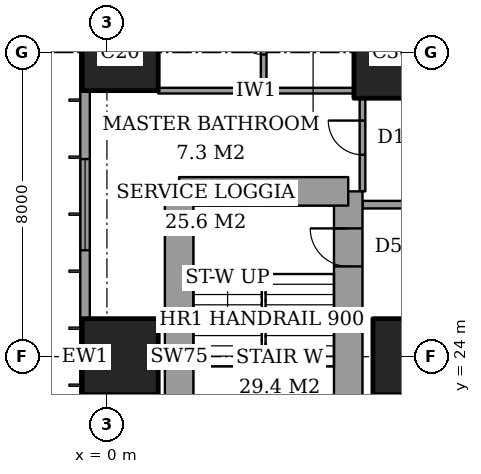
"""IFC4 building model, lengths in metres.
Left out: names, types, materials, properties, quantities, classifications, styles, units other than length and angle.
Written with IfcOpenShell. Run it as: python <this file> out.ifc"""

import sys

from ifc_helpers import new_model, si_unit, direction, frame, frame_2d, origin, origin_2d, place, context, subcontext, project, spatial, rectangle, extrude, element, fill, save


model = new_model("IFC4")
c1 = context("Model", 3, precision=1e-05, world=origin(), true_north=direction((0.0, 1.0)))
c2 = subcontext(c1, "Body", "Model", "MODEL_VIEW")
j1 = project(units=[si_unit("LENGTHUNIT", "METRE"), si_unit("PLANEANGLEUNIT", "RADIAN")], contexts=[c1])
p1 = place(None, origin())
s1 = spatial("IfcSite", under=j1, at=p1, CompositionType="ELEMENT")
p2 = place(p1, origin())
s2 = spatial("IfcBuilding", under=s1, at=p2, CompositionType="ELEMENT")
p3 = place(p2, frame((0.0, 0.0, 33.2)))
s3 = spatial("IfcBuildingStorey", under=s2, at=p3, CompositionType="ELEMENT", Elevation=33.2)
for number, where, z_axis, x_axis in (
    (1, (0.35, 24.0, 0.0), (0.0, 0.0, 1.0), (1.0, 0.0, 0.0)),
    (2, (0.35, 32.0, 0.0), (0.0, 0.0, 1.0), (1.0, 0.0, 0.0)),
    (3, (8.0, 24.0, 0.0), (0.0, 0.0, 1.0), (1.0, 0.0, 0.0)),
):
    element("IfcColumn", number, at=place(p3, frame(where, z_axis=z_axis, x_axis=x_axis)), inside=s3, PredefinedType="COLUMN", context=c2, shape_type="SweptSolid", body=[
        extrude(rectangle(XDim=2.0, YDim=2.0, at=origin_2d()), origin(), (0.0, 0.0, 1.0), 3.6),
    ])
p4 = place(p3, frame((8.0, 32.0, 0.0), z_axis=(0.0, 0.0, 1.0), x_axis=(1.0, 0.0, 0.0)))
e4 = element("IfcColumn", 4, at=p4, inside=s3, PredefinedType="COLUMN", context=c2, shape_type="SweptSolid", body=[
    extrude(rectangle(XDim=3.0, YDim=2.4, at=origin_2d()), origin(), (0.0, 0.0, 1.0), 3.6),
])
p5 = place(p3, frame((6.35, 19.65, 0.0), z_axis=(0.0, 0.0, 1.0), x_axis=(0.0, 1.0, 0.0)))
e5 = element("IfcWall", 5, at=p5, inside=s3, PredefinedType="SHEAR", context=c2, shape_type="SweptSolid", body=[
    extrude(rectangle(XDim=8.7, YDim=0.75, at=frame_2d((4.35, 0.0))), origin(), (0.0, 0.0, 1.0), 3.6),
])
p6 = place(p5, frame((6.725, 0.0, 0.0)))
e6 = element("IfcOpeningElement", 6, at=p6, cuts=e5, PredefinedType="OPENING", context=c2, shape_type="SweptSolid", body=[
    extrude(rectangle(XDim=1.0, YDim=2.1, at=frame_2d((0.5, 1.05))), frame((0.0, 0.385, 0.0), z_axis=(0.0, -1.0, 0.0), x_axis=(1.0, 0.0, 0.0)), (0.0, 0.0, 1.0), 0.77),
])
p7 = place(p3, frame((6.35, 28.35, 0.0), z_axis=(0.0, 0.0, 1.0), x_axis=(-1.0, 0.0, 0.0)))
e7 = element("IfcWall", 7, at=p7, inside=s3, PredefinedType="SHEAR", context=c2, shape_type="SweptSolid", body=[
    extrude(rectangle(XDim=4.45, YDim=0.75, at=frame_2d((2.225, 0.0))), origin(), (0.0, 0.0, 1.0), 3.6),
])
p8 = place(p3, frame((1.9, 28.35, 0.0), z_axis=(0.0, 0.0, 1.0), x_axis=(0.0, -1.0, 0.0)))
e8 = element("IfcWall", 8, at=p8, inside=s3, PredefinedType="SHEAR", context=c2, shape_type="SweptSolid", body=[
    extrude(rectangle(XDim=8.7, YDim=0.75, at=frame_2d((4.35, 0.0))), origin(), (0.0, 0.0, 1.0), 3.6),
])
p9 = place(p3, frame((-0.575, 44.825, 0.0), z_axis=(0.0, 0.0, 1.0), x_axis=(0.0, -1.0, 0.0)))
e9 = element("IfcWall", 9, at=p9, inside=s3, PredefinedType="SOLIDWALL", context=c2, shape_type="SweptSolid", body=[
    extrude(rectangle(XDim=41.65, YDim=0.25, at=frame_2d((20.825, 0.0))), origin(), (0.0, 0.0, 1.0), 3.6),
])
p10 = place(p9, frame((0.775, 0.0, 0.6)))
e10 = element("IfcOpeningElement", 10, at=p10, cuts=e9, PredefinedType="OPENING", context=c2, shape_type="SweptSolid", body=[
    extrude(rectangle(XDim=2.4, YDim=2.0, at=frame_2d((1.2, 1.0))), frame((0.0, 0.135, 0.0), z_axis=(0.0, -1.0, 0.0), x_axis=(1.0, 0.0, 0.0)), (0.0, 0.0, 1.0), 0.27),
])
p11 = place(p9, frame((6.225, 0.0, 0.6)))
e11 = element("IfcOpeningElement", 11, at=p11, cuts=e9, PredefinedType="OPENING", context=c2, shape_type="SweptSolid", body=[
    extrude(rectangle(XDim=1.2, YDim=2.0, at=frame_2d((0.6, 1.0))), frame((0.0, 0.135, 0.0), z_axis=(0.0, -1.0, 0.0), x_axis=(1.0, 0.0, 0.0)), (0.0, 0.0, 1.0), 0.27),
])
p12 = place(p9, frame((8.625, 0.0, 0.6)))
e12 = element("IfcOpeningElement", 12, at=p12, cuts=e9, PredefinedType="OPENING", context=c2, shape_type="SweptSolid", body=[
    extrude(rectangle(XDim=2.4, YDim=2.0, at=frame_2d((1.2, 1.0))), frame((0.0, 0.135, 0.0), z_axis=(0.0, -1.0, 0.0), x_axis=(1.0, 0.0, 0.0)), (0.0, 0.0, 1.0), 0.27),
])
p13 = place(p9, frame((15.625, 0.0, 0.6)))
e13 = element("IfcOpeningElement", 13, at=p13, cuts=e9, PredefinedType="OPENING", context=c2, shape_type="SweptSolid", body=[
    extrude(rectangle(XDim=2.4, YDim=2.0, at=frame_2d((1.2, 1.0))), frame((0.0, 0.135, 0.0), z_axis=(0.0, -1.0, 0.0), x_axis=(1.0, 0.0, 0.0)), (0.0, 0.0, 1.0), 0.27),
])
p14 = place(p9, frame((23.625, 0.0, 0.6)))
e14 = element("IfcOpeningElement", 14, at=p14, cuts=e9, PredefinedType="OPENING", context=c2, shape_type="SweptSolid", body=[
    extrude(rectangle(XDim=2.4, YDim=2.0, at=frame_2d((1.2, 1.0))), frame((0.0, 0.135, 0.0), z_axis=(0.0, -1.0, 0.0), x_axis=(1.0, 0.0, 0.0)), (0.0, 0.0, 1.0), 0.27),
])
p15 = place(p9, frame((30.825, 0.0, 0.6)))
e15 = element("IfcOpeningElement", 15, at=p15, cuts=e9, PredefinedType="OPENING", context=c2, shape_type="SweptSolid", body=[
    extrude(rectangle(XDim=2.4, YDim=2.0, at=frame_2d((1.2, 1.0))), frame((0.0, 0.135, 0.0), z_axis=(0.0, -1.0, 0.0), x_axis=(1.0, 0.0, 0.0)), (0.0, 0.0, 1.0), 0.27),
])
p16 = place(p9, frame((34.5, 0.0, 0.6)))
e16 = element("IfcOpeningElement", 16, at=p16, cuts=e9, PredefinedType="OPENING", context=c2, shape_type="SweptSolid", body=[
    extrude(rectangle(XDim=1.2, YDim=2.0, at=frame_2d((0.6, 1.0))), frame((0.0, 0.135, 0.0), z_axis=(0.0, -1.0, 0.0), x_axis=(1.0, 0.0, 0.0)), (0.0, 0.0, 1.0), 0.27),
])
p17 = place(p9, frame((38.475, 0.0, 0.6)))
e17 = element("IfcOpeningElement", 17, at=p17, cuts=e9, PredefinedType="OPENING", context=c2, shape_type="SweptSolid", body=[
    extrude(rectangle(XDim=2.4, YDim=2.0, at=frame_2d((1.2, 1.0))), frame((0.0, 0.135, 0.0), z_axis=(0.0, -1.0, 0.0), x_axis=(1.0, 0.0, 0.0)), (0.0, 0.0, 1.0), 0.27),
])
p18 = place(p3, frame((6.725, 28.0, 0.0), z_axis=(0.0, 0.0, 1.0), x_axis=(1.0, 0.0, 0.0)))
e18 = element("IfcWall", 18, at=p18, inside=s3, PredefinedType="PARTITIONING", context=c2, shape_type="SweptSolid", body=[
    extrude(rectangle(XDim=17.275, YDim=0.2, at=frame_2d((8.637, 0.0))), origin(), (0.0, 0.0, 1.0), 3.35),
])
p19 = place(p18, frame((7.175, 0.0, 0.0)))
e19 = element("IfcOpeningElement", 19, at=p19, cuts=e18, PredefinedType="OPENING", context=c2, shape_type="SweptSolid", body=[
    extrude(rectangle(XDim=1.2, YDim=2.4, at=frame_2d((0.6, 1.2))), frame((0.0, 0.11, 0.0), z_axis=(0.0, -1.0, 0.0), x_axis=(1.0, 0.0, 0.0)), (0.0, 0.0, 1.0), 0.22),
])
p20 = place(p3, frame((1.35, 31.0, 0.0), z_axis=(0.0, 0.0, 1.0), x_axis=(1.0, 0.0, 0.0)))
e20 = element("IfcWall", 20, at=p20, inside=s3, PredefinedType="PARTITIONING", context=c2, shape_type="SweptSolid", body=[
    extrude(rectangle(XDim=5.15, YDim=0.15, at=frame_2d((2.575, 0.0))), origin(), (0.0, 0.0, 1.0), 3.35),
])
p21 = place(p3, frame((4.125, 31.0, 0.0), z_axis=(0.0, 0.0, 1.0), x_axis=(0.0, 1.0, 0.0)))
e21 = element("IfcWall", 21, at=p21, inside=s3, PredefinedType="PARTITIONING", context=c2, shape_type="SweptSolid", body=[
    extrude(rectangle(XDim=2.8, YDim=0.15, at=frame_2d((1.4, 0.0))), origin(), (0.0, 0.0, 1.0), 3.35),
])
p22 = place(p21, frame((0.95, 0.0, 0.0)))
e22 = element("IfcOpeningElement", 22, at=p22, cuts=e21, PredefinedType="OPENING", context=c2, shape_type="SweptSolid", body=[
    extrude(rectangle(XDim=0.9, YDim=2.1, at=frame_2d((0.45, 1.05))), frame((0.0, 0.085, 0.0), z_axis=(0.0, -1.0, 0.0), x_axis=(1.0, 0.0, 0.0)), (0.0, 0.0, 1.0), 0.17),
])
p23 = place(p3, frame((6.725, 28.35, 0.0), z_axis=(0.0, 0.0, 1.0), x_axis=(0.0, 1.0, 0.0)))
e23 = element("IfcWall", 23, at=p23, inside=s3, PredefinedType="PARTITIONING", context=c2, shape_type="SweptSolid", body=[
    extrude(rectangle(XDim=2.45, YDim=0.15, at=frame_2d((1.225, 0.0))), origin(), (0.0, 0.0, 1.0), 3.35),
])
p24 = place(p23, frame((0.962, 0.0, 0.0)))
e24 = element("IfcOpeningElement", 24, at=p24, cuts=e23, PredefinedType="OPENING", context=c2, shape_type="SweptSolid", body=[
    extrude(rectangle(XDim=0.9, YDim=2.1, at=frame_2d((0.45, 1.05))), frame((0.0, 0.085, 0.0), z_axis=(0.0, -1.0, 0.0), x_axis=(1.0, 0.0, 0.0)), (0.0, 0.0, 1.0), 0.17),
])
p25 = place(p13, origin())
e25 = element("IfcWindow", 25, at=p25, inside=s3, PartitioningType="SINGLE_PANEL", PredefinedType="WINDOW", context=c2, shape_type="SweptSolid", body=[
    extrude(rectangle(XDim=2.4, YDim=2.0, at=frame_2d((1.2, 1.0))), frame((0.0, 0.03, 0.0), z_axis=(0.0, -1.0, 0.0), x_axis=(1.0, 0.0, 0.0)), (0.0, 0.0, 1.0), 0.06),
])
fill(e13, e25)
p26 = place(p22, origin())
e26 = element("IfcDoor", 26, at=p26, inside=s3, OperationType="SINGLE_SWING_LEFT", PredefinedType="DOOR", context=c2, shape_type="SweptSolid", body=[
    extrude(rectangle(XDim=0.9, YDim=2.1, at=frame_2d((0.45, 1.05))), frame((0.0, 0.025, 0.0), z_axis=(0.0, -1.0, 0.0), x_axis=(1.0, 0.0, 0.0)), (0.0, 0.0, 1.0), 0.05),
])
fill(e22, e26)
p27 = place(p24, origin())
e27 = element("IfcDoor", 27, at=p27, inside=s3, OperationType="SINGLE_SWING_LEFT", PredefinedType="DOOR", context=c2, shape_type="SweptSolid", body=[
    extrude(rectangle(XDim=0.9, YDim=2.1, at=frame_2d((0.45, 1.05))), frame((0.0, 0.025, 0.0), z_axis=(0.0, -1.0, 0.0), x_axis=(1.0, 0.0, 0.0)), (0.0, 0.0, 1.0), 0.05),
])
fill(e24, e27)
p28 = place(p6, origin())
e28 = element("IfcDoor", 28, at=p28, inside=s3, OperationType="SINGLE_SWING_LEFT", PredefinedType="DOOR", context=c2, shape_type="SweptSolid", body=[
    extrude(rectangle(XDim=1.0, YDim=2.1, at=frame_2d((0.5, 1.05))), frame((0.0, 0.025, 0.0), z_axis=(0.0, -1.0, 0.0), x_axis=(1.0, 0.0, 0.0)), (0.0, 0.0, 1.0), 0.05),
])
fill(e6, e28)
save(model, sys.argv[1])
